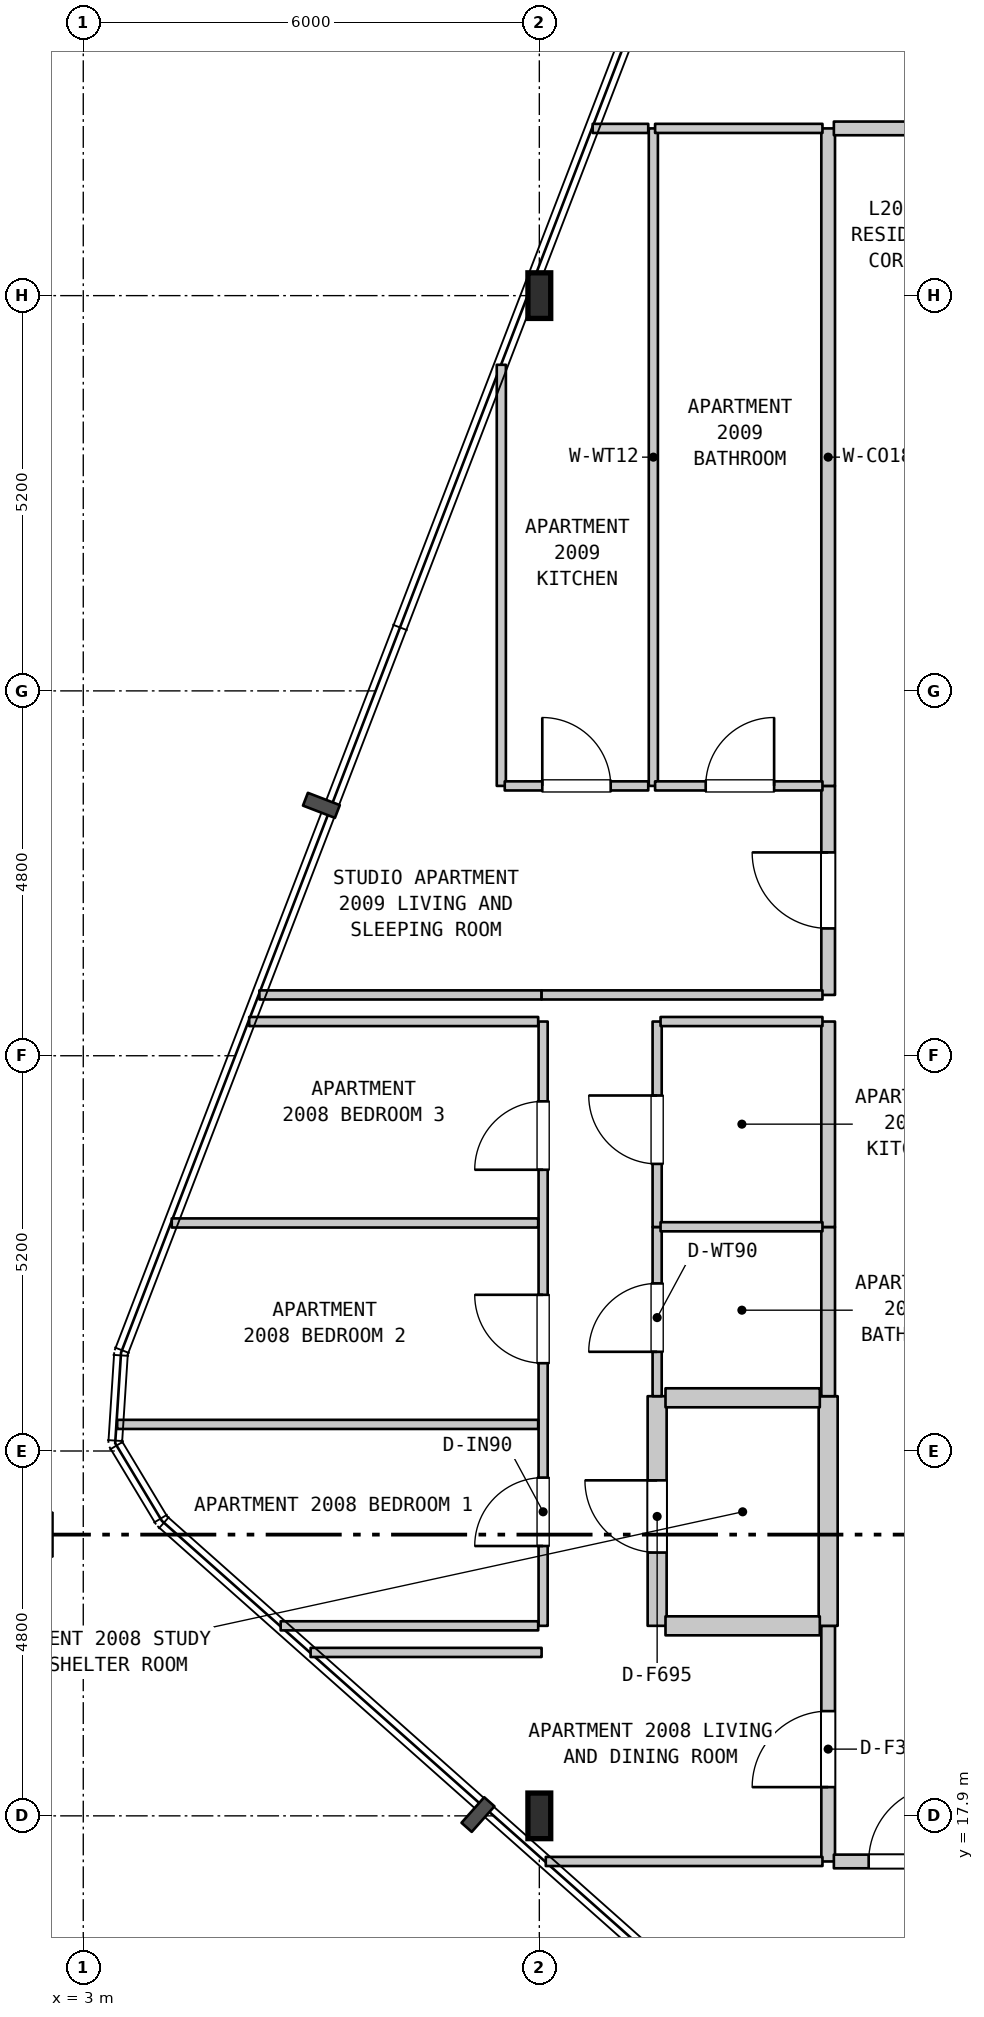
"""IFC4 building model, lengths in metres.
Left out: names, types, materials, properties, quantities, classifications, styles, units other than length and angle.
Written with IfcOpenShell. Run it as: python <this file> out.ifc"""

import sys

from ifc_helpers import new_model, si_unit, direction, frame, frame_2d, origin, origin_2d, place, context, subcontext, project, spatial, rectangle, i_section, extrude, element, fill, save


model = new_model("IFC4")
c1 = context("Model", 3, precision=1e-05, world=origin(), true_north=direction((0.0, 1.0)))
c2 = subcontext(c1, "Body", "Model", "MODEL_VIEW")
j1 = project(units=[si_unit("LENGTHUNIT", "METRE"), si_unit("PLANEANGLEUNIT", "RADIAN")], contexts=[c1])
p1 = place(None, origin())
s1 = spatial("IfcSite", under=j1, at=p1, CompositionType="ELEMENT")
p2 = place(p1, origin())
s2 = spatial("IfcBuilding", under=s1, at=p2, CompositionType="ELEMENT")
p3 = place(p2, frame((0.0, 0.0, 86.4)))
s3 = spatial("IfcBuildingStorey", under=s2, at=p3, CompositionType="ELEMENT", Elevation=86.4)
for number, where, z_axis, x_axis in (
    (1, (9.0, 17.9, 0.0), (0.0, 0.0, 1.0), (1.0, 0.0, 0.0)),
    (2, (9.0, 37.9, 0.0), (0.0, 0.0, 1.0), (1.0, 0.0, 0.0)),
):
    element("IfcColumn", number, at=place(p3, frame(where, z_axis=z_axis, x_axis=x_axis)), inside=s3, PredefinedType="COLUMN", context=c2, shape_type="SweptSolid", body=[
        extrude(i_section(OverallWidth=0.3, OverallDepth=0.6, WebThickness=0.015, FlangeThickness=0.03, FilletRadius=0.027, at=origin_2d()), origin(), (0.0, 0.0, 1.0), 4.5),
    ])
p4 = place(p3, frame((8.5, 31.45, 0.0), z_axis=(0.0, 0.0, 1.0), x_axis=(0.0, 1.0, 0.0)))
e3 = element("IfcWall", 3, at=p4, inside=s3, PredefinedType="PARTITIONING", context=c2, shape_type="SweptSolid", body=[
    extrude(rectangle(XDim=5.54, YDim=0.12, at=frame_2d((2.77, 0.0))), origin(), (0.0, 0.0, 1.0), 4.185),
])
p5 = place(p3, frame((9.05, 20.4, 0.0), z_axis=(0.0, 0.0, 1.0), x_axis=(0.0, 1.0, 0.0)))
e4 = element("IfcWall", 4, at=p5, inside=s3, PredefinedType="PARTITIONING", context=c2, shape_type="SweptSolid", body=[
    extrude(rectangle(XDim=7.95, YDim=0.12, at=frame_2d((3.975, 0.0))), origin(), (0.0, 0.0, 1.0), 3.585),
])
p6 = place(p5, frame((1.05, 0.0, 0.0)))
e5 = element("IfcOpeningElement", 5, at=p6, cuts=e4, PredefinedType="OPENING", context=c2, shape_type="SweptSolid", body=[
    extrude(rectangle(XDim=0.9, YDim=2.15, at=frame_2d((0.45, 1.075))), frame((0.0, 0.07, 0.0), z_axis=(0.0, -1.0, 0.0), x_axis=(1.0, 0.0, 0.0)), (0.0, 0.0, 1.0), 0.14),
])
p7 = place(p5, frame((3.455, 0.0, 0.0)))
e6 = element("IfcOpeningElement", 6, at=p7, cuts=e4, PredefinedType="OPENING", context=c2, shape_type="SweptSolid", body=[
    extrude(rectangle(XDim=0.9, YDim=2.15, at=frame_2d((0.45, 1.075))), frame((0.0, 0.07, 0.0), z_axis=(0.0, -1.0, 0.0), x_axis=(1.0, 0.0, 0.0)), (0.0, 0.0, 1.0), 0.14),
])
p8 = place(p5, frame((6.0, 0.0, 0.0)))
e7 = element("IfcOpeningElement", 7, at=p8, cuts=e4, PredefinedType="OPENING", context=c2, shape_type="SweptSolid", body=[
    extrude(rectangle(XDim=0.9, YDim=2.15, at=frame_2d((0.45, 1.075))), frame((0.0, 0.07, 0.0), z_axis=(0.0, -1.0, 0.0), x_axis=(1.0, 0.0, 0.0)), (0.0, 0.0, 1.0), 0.14),
])
p9 = place(p3, frame((10.5, 31.45, 0.0), z_axis=(0.0, 0.0, 1.0), x_axis=(0.0, 1.0, 0.0)))
e8 = element("IfcWall", 8, at=p9, inside=s3, PredefinedType="PARTITIONING", context=c2, shape_type="SweptSolid", body=[
    extrude(rectangle(XDim=8.65, YDim=0.12, at=frame_2d((4.325, 0.0))), origin(), (0.0, 0.0, 1.0), 4.185),
])
p10 = place(p3, frame((10.55, 20.4, 0.0), z_axis=(0.0, 0.0, 1.0), x_axis=(0.0, 1.0, 0.0)))
e9 = element("IfcWall", 9, at=p10, inside=s3, PredefinedType="STANDARD", context=c2, shape_type="SweptSolid", body=[
    extrude(rectangle(XDim=3.021, YDim=0.25, at=frame_2d((1.51, 0.0))), origin(), (0.0, 0.0, 1.0), 4.185),
])
p11 = place(p10, frame((0.964, 0.0, 0.0)))
e10 = element("IfcOpeningElement", 10, at=p11, cuts=e9, PredefinedType="OPENING", context=c2, shape_type="SweptSolid", body=[
    extrude(rectangle(XDim=0.95, YDim=2.15, at=frame_2d((0.475, 1.075))), frame((0.0, 0.135, 0.0), z_axis=(0.0, -1.0, 0.0), x_axis=(1.0, 0.0, 0.0)), (0.0, 0.0, 1.0), 0.27),
])
p12 = place(p3, frame((10.55, 23.421, 0.0), z_axis=(0.0, 0.0, 1.0), x_axis=(0.0, 1.0, 0.0)))
e11 = element("IfcWall", 11, at=p12, inside=s3, PredefinedType="PARTITIONING", context=c2, shape_type="SweptSolid", body=[
    extrude(rectangle(XDim=2.226, YDim=0.12, at=frame_2d((1.113, 0.0))), origin(), (0.0, 0.0, 1.0), 4.185),
])
p13 = place(p12, frame((0.584, 0.0, 0.0)))
e12 = element("IfcOpeningElement", 12, at=p13, cuts=e11, PredefinedType="OPENING", context=c2, shape_type="SweptSolid", body=[
    extrude(rectangle(XDim=0.9, YDim=2.1, at=frame_2d((0.45, 1.05))), frame((0.0, 0.07, 0.0), z_axis=(0.0, -1.0, 0.0), x_axis=(1.0, 0.0, 0.0)), (0.0, 0.0, 1.0), 0.14),
])
p14 = place(p3, frame((10.55, 25.647, 0.0), z_axis=(0.0, 0.0, 1.0), x_axis=(0.0, 1.0, 0.0)))
e13 = element("IfcWall", 13, at=p14, inside=s3, PredefinedType="PARTITIONING", context=c2, shape_type="SweptSolid", body=[
    extrude(rectangle(XDim=2.703, YDim=0.12, at=frame_2d((1.352, 0.0))), origin(), (0.0, 0.0, 1.0), 4.185),
])
p15 = place(p14, frame((0.83, 0.0, 0.0)))
e14 = element("IfcOpeningElement", 14, at=p15, cuts=e13, PredefinedType="OPENING", context=c2, shape_type="SweptSolid", body=[
    extrude(rectangle(XDim=0.9, YDim=2.15, at=frame_2d((0.45, 1.075))), frame((0.0, 0.07, 0.0), z_axis=(0.0, -1.0, 0.0), x_axis=(1.0, 0.0, 0.0)), (0.0, 0.0, 1.0), 0.14),
])
p16 = place(p3, frame((12.8, 17.3, 0.0), z_axis=(0.0, 0.0, 1.0), x_axis=(0.0, 1.0, 0.0)))
e15 = element("IfcWall", 15, at=p16, inside=s3, PredefinedType="STANDARD", context=c2, shape_type="SweptSolid", body=[
    extrude(rectangle(XDim=3.1, YDim=0.18, at=frame_2d((1.55, 0.0))), origin(), (0.0, 0.0, 1.0), 4.185),
])
p17 = place(p16, frame((0.978, 0.0, 0.0)))
e16 = element("IfcOpeningElement", 16, at=p17, cuts=e15, PredefinedType="OPENING", context=c2, shape_type="SweptSolid", body=[
    extrude(rectangle(XDim=1.0, YDim=2.15, at=frame_2d((0.5, 1.075))), frame((0.0, 0.1, 0.0), z_axis=(0.0, -1.0, 0.0), x_axis=(1.0, 0.0, 0.0)), (0.0, 0.0, 1.0), 0.2),
])
p18 = place(p3, frame((12.8, 20.4, 0.0), z_axis=(0.0, 0.0, 1.0), x_axis=(0.0, 1.0, 0.0)))
e17 = element("IfcWall", 17, at=p18, inside=s3, PredefinedType="STANDARD", context=c2, shape_type="SweptSolid", body=[
    extrude(rectangle(XDim=3.021, YDim=0.25, at=frame_2d((1.51, 0.0))), origin(), (0.0, 0.0, 1.0), 4.185),
])
p19 = place(p3, frame((12.8, 23.421, 0.0), z_axis=(0.0, 0.0, 1.0), x_axis=(0.0, 1.0, 0.0)))
e18 = element("IfcWall", 18, at=p19, inside=s3, PredefinedType="STANDARD", context=c2, shape_type="SweptSolid", body=[
    extrude(rectangle(XDim=2.226, YDim=0.18, at=frame_2d((1.113, 0.0))), origin(), (0.0, 0.0, 1.0), 4.185),
])
p20 = place(p3, frame((12.8, 25.647, 0.0), z_axis=(0.0, 0.0, 1.0), x_axis=(0.0, 1.0, 0.0)))
e19 = element("IfcWall", 19, at=p20, inside=s3, PredefinedType="STANDARD", context=c2, shape_type="SweptSolid", body=[
    extrude(rectangle(XDim=2.703, YDim=0.18, at=frame_2d((1.352, 0.0))), origin(), (0.0, 0.0, 1.0), 4.185),
])
p21 = place(p3, frame((12.8, 28.7, 0.0), z_axis=(0.0, 0.0, 1.0), x_axis=(0.0, 1.0, 0.0)))
e20 = element("IfcWall", 20, at=p21, inside=s3, PredefinedType="STANDARD", context=c2, shape_type="SweptSolid", body=[
    extrude(rectangle(XDim=2.75, YDim=0.18, at=frame_2d((1.375, 0.0))), origin(), (0.0, 0.0, 1.0), 4.185),
])
p22 = place(p21, frame((0.875, 0.0, 0.0)))
e21 = element("IfcOpeningElement", 21, at=p22, cuts=e20, PredefinedType="OPENING", context=c2, shape_type="SweptSolid", body=[
    extrude(rectangle(XDim=1.0, YDim=2.15, at=frame_2d((0.5, 1.075))), frame((0.0, 0.1, 0.0), z_axis=(0.0, -1.0, 0.0), x_axis=(1.0, 0.0, 0.0)), (0.0, 0.0, 1.0), 0.2),
])
p23 = place(p3, frame((12.8, 31.45, 0.0), z_axis=(0.0, 0.0, 1.0), x_axis=(0.0, 1.0, 0.0)))
e22 = element("IfcWall", 22, at=p23, inside=s3, PredefinedType="STANDARD", context=c2, shape_type="SweptSolid", body=[
    extrude(rectangle(XDim=8.65, YDim=0.18, at=frame_2d((4.325, 0.0))), origin(), (0.0, 0.0, 1.0), 4.185),
])
p24 = place(p3, frame((9.085, 17.3, 0.0), z_axis=(0.0, 0.0, 1.0), x_axis=(1.0, 0.0, 0.0)))
e23 = element("IfcWall", 23, at=p24, inside=s3, PredefinedType="PARTITIONING", context=c2, shape_type="SweptSolid", body=[
    extrude(rectangle(XDim=3.64, YDim=0.12, at=frame_2d((1.82, 0.0))), origin(), (0.0, 0.0, 1.0), 4.185),
])
p25 = place(p3, frame((12.875, 17.3, 0.0), z_axis=(0.0, 0.0, 1.0), x_axis=(1.0, 0.0, 0.0)))
e24 = element("IfcWall", 24, at=p25, inside=s3, PredefinedType="STANDARD", context=c2, shape_type="SweptSolid", body=[
    extrude(rectangle(XDim=3.78, YDim=0.18, at=frame_2d((1.89, 0.0))), origin(), (0.0, 0.0, 1.0), 4.185),
])
p26 = place(p25, frame((0.458, 0.0, 0.0)))
e25 = element("IfcOpeningElement", 25, at=p26, cuts=e24, PredefinedType="OPENING", context=c2, shape_type="SweptSolid", body=[
    extrude(rectangle(XDim=1.0, YDim=2.15, at=frame_2d((0.5, 1.075))), frame((0.0, 0.1, 0.0), z_axis=(0.0, -1.0, 0.0), x_axis=(1.0, 0.0, 0.0)), (0.0, 0.0, 1.0), 0.2),
])
p27 = place(p3, frame((5.991, 20.05, 0.0), z_axis=(0.0, 0.0, 1.0), x_axis=(1.0, 0.0, 0.0)))
e26 = element("IfcWall", 26, at=p27, inside=s3, PredefinedType="PARTITIONING", context=c2, shape_type="SweptSolid", body=[
    extrude(rectangle(XDim=3.039, YDim=0.12, at=frame_2d((1.52, 0.0))), origin(), (0.0, 0.0, 1.0), 4.185),
])
p28 = place(p3, frame((5.597, 20.4, 0.0), z_axis=(0.0, 0.0, 1.0), x_axis=(1.0, 0.0, 0.0)))
e27 = element("IfcWall", 27, at=p28, inside=s3, PredefinedType="PARTITIONING", context=c2, shape_type="SweptSolid", body=[
    extrude(rectangle(XDim=3.388, YDim=0.12, at=frame_2d((1.694, 0.0))), origin(), (0.0, 0.0, 1.0), 4.185),
])
p29 = place(p3, frame((10.66, 20.4, 0.0), z_axis=(0.0, 0.0, 1.0), x_axis=(1.0, 0.0, 0.0)))
e28 = element("IfcWall", 28, at=p29, inside=s3, PredefinedType="STANDARD", context=c2, shape_type="SweptSolid", body=[
    extrude(rectangle(XDim=2.03, YDim=0.25, at=frame_2d((1.015, 0.0))), origin(), (0.0, 0.0, 1.0), 4.185),
])
p30 = place(p3, frame((3.446, 23.05, 0.0), z_axis=(0.0, 0.0, 1.0), x_axis=(1.0, 0.0, 0.0)))
e29 = element("IfcWall", 29, at=p30, inside=s3, PredefinedType="PARTITIONING", context=c2, shape_type="SweptSolid", body=[
    extrude(rectangle(XDim=5.539, YDim=0.12, at=frame_2d((2.77, 0.0))), origin(), (0.0, 0.0, 1.0), 4.185),
])
p31 = place(p3, frame((10.66, 23.4, 0.0), z_axis=(0.0, 0.0, 1.0), x_axis=(1.0, 0.0, 0.0)))
e30 = element("IfcWall", 30, at=p31, inside=s3, PredefinedType="STANDARD", context=c2, shape_type="SweptSolid", body=[
    extrude(rectangle(XDim=2.03, YDim=0.25, at=frame_2d((1.015, 0.0))), origin(), (0.0, 0.0, 1.0), 4.185),
])
p32 = place(p3, frame((10.595, 25.65, 0.0), z_axis=(0.0, 0.0, 1.0), x_axis=(1.0, 0.0, 0.0)))
e31 = element("IfcWall", 31, at=p32, inside=s3, PredefinedType="PARTITIONING", context=c2, shape_type="SweptSolid", body=[
    extrude(rectangle(XDim=2.13, YDim=0.12, at=frame_2d((1.065, 0.0))), origin(), (0.0, 0.0, 1.0), 4.185),
])
p33 = place(p3, frame((4.164, 25.7, 0.0), z_axis=(0.0, 0.0, 1.0), x_axis=(1.0, 0.0, 0.0)))
e32 = element("IfcWall", 32, at=p33, inside=s3, PredefinedType="PARTITIONING", context=c2, shape_type="SweptSolid", body=[
    extrude(rectangle(XDim=4.821, YDim=0.12, at=frame_2d((2.411, 0.0))), origin(), (0.0, 0.0, 1.0), 4.185),
])
p34 = place(p3, frame((5.183, 28.35, 0.0), z_axis=(0.0, 0.0, 1.0), x_axis=(1.0, 0.0, 0.0)))
e33 = element("IfcWall", 33, at=p34, inside=s3, PredefinedType="PARTITIONING", context=c2, shape_type="SweptSolid", body=[
    extrude(rectangle(XDim=3.802, YDim=0.12, at=frame_2d((1.901, 0.0))), origin(), (0.0, 0.0, 1.0), 4.185),
])
p35 = place(p3, frame((10.595, 28.35, 0.0), z_axis=(0.0, 0.0, 1.0), x_axis=(1.0, 0.0, 0.0)))
e34 = element("IfcWall", 34, at=p35, inside=s3, PredefinedType="PARTITIONING", context=c2, shape_type="SweptSolid", body=[
    extrude(rectangle(XDim=2.13, YDim=0.12, at=frame_2d((1.065, 0.0))), origin(), (0.0, 0.0, 1.0), 4.185),
])
p36 = place(p3, frame((5.317, 28.7, 0.0), z_axis=(0.0, 0.0, 1.0), x_axis=(1.0, 0.0, 0.0)))
e35 = element("IfcWall", 35, at=p36, inside=s3, PredefinedType="PARTITIONING", context=c2, shape_type="SweptSolid", body=[
    extrude(rectangle(XDim=3.713, YDim=0.12, at=frame_2d((1.856, 0.0))), origin(), (0.0, 0.0, 1.0), 4.185),
])
p37 = place(p3, frame((9.03, 28.7, 0.0), z_axis=(0.0, 0.0, 1.0), x_axis=(1.0, 0.0, 0.0)))
e36 = element("IfcWall", 36, at=p37, inside=s3, PredefinedType="PARTITIONING", context=c2, shape_type="SweptSolid", body=[
    extrude(rectangle(XDim=3.695, YDim=0.12, at=frame_2d((1.848, 0.0))), origin(), (0.0, 0.0, 1.0), 4.185),
])
p38 = place(p3, frame((8.545, 31.45, 0.0), z_axis=(0.0, 0.0, 1.0), x_axis=(1.0, 0.0, 0.0)))
e37 = element("IfcWall", 37, at=p38, inside=s3, PredefinedType="PARTITIONING", context=c2, shape_type="SweptSolid", body=[
    extrude(rectangle(XDim=1.888, YDim=0.12, at=frame_2d((0.944, 0.0))), origin(), (0.0, 0.0, 1.0), 4.185),
])
p39 = place(p38, frame((0.494, 0.0, 0.0)))
e38 = element("IfcOpeningElement", 38, at=p39, cuts=e37, PredefinedType="OPENING", context=c2, shape_type="SweptSolid", body=[
    extrude(rectangle(XDim=0.9, YDim=2.15, at=frame_2d((0.45, 1.075))), frame((0.0, 0.07, 0.0), z_axis=(0.0, -1.0, 0.0), x_axis=(1.0, 0.0, 0.0)), (0.0, 0.0, 1.0), 0.14),
])
p40 = place(p3, frame((10.523, 31.45, 0.0), z_axis=(0.0, 0.0, 1.0), x_axis=(1.0, 0.0, 0.0)))
e39 = element("IfcWall", 39, at=p40, inside=s3, PredefinedType="PARTITIONING", context=c2, shape_type="SweptSolid", body=[
    extrude(rectangle(XDim=2.202, YDim=0.12, at=frame_2d((1.101, 0.0))), origin(), (0.0, 0.0, 1.0), 4.185),
])
p41 = place(p40, frame((0.666, 0.0, 0.0)))
e40 = element("IfcOpeningElement", 40, at=p41, cuts=e39, PredefinedType="OPENING", context=c2, shape_type="SweptSolid", body=[
    extrude(rectangle(XDim=0.9, YDim=2.1, at=frame_2d((0.45, 1.05))), frame((0.0, 0.07, 0.0), z_axis=(0.0, -1.0, 0.0), x_axis=(1.0, 0.0, 0.0)), (0.0, 0.0, 1.0), 0.14),
])
p42 = place(p3, frame((9.702, 40.1, 0.0), z_axis=(0.0, 0.0, 1.0), x_axis=(1.0, 0.0, 0.0)))
e41 = element("IfcWall", 41, at=p42, inside=s3, PredefinedType="PARTITIONING", context=c2, shape_type="SweptSolid", body=[
    extrude(rectangle(XDim=0.731, YDim=0.12, at=frame_2d((0.366, 0.0))), origin(), (0.0, 0.0, 1.0), 4.185),
])
p43 = place(p3, frame((10.523, 40.1, 0.0), z_axis=(0.0, 0.0, 1.0), x_axis=(1.0, 0.0, 0.0)))
e42 = element("IfcWall", 42, at=p43, inside=s3, PredefinedType="PARTITIONING", context=c2, shape_type="SweptSolid", body=[
    extrude(rectangle(XDim=2.202, YDim=0.12, at=frame_2d((1.101, 0.0))), origin(), (0.0, 0.0, 1.0), 4.185),
])
p44 = place(p3, frame((12.875, 40.1, 0.0), z_axis=(0.0, 0.0, 1.0), x_axis=(1.0, 0.0, 0.0)))
e43 = element("IfcWall", 43, at=p44, inside=s3, PredefinedType="STANDARD", context=c2, shape_type="SweptSolid", body=[
    extrude(rectangle(XDim=3.49, YDim=0.18, at=frame_2d((1.745, 0.0))), origin(), (0.0, 0.0, 1.0), 4.185),
])
p45 = place(p44, frame((1.16, 0.0, 0.0)))
e44 = element("IfcOpeningElement", 44, at=p45, cuts=e43, PredefinedType="OPENING", context=c2, shape_type="SweptSolid", body=[
    extrude(rectangle(XDim=1.0, YDim=2.15, at=frame_2d((0.5, 1.075))), frame((0.0, 0.1, 0.0), z_axis=(0.0, -1.0, 0.0), x_axis=(1.0, 0.0, 0.0)), (0.0, 0.0, 1.0), 0.2),
])
p46 = place(p6, origin())
e45 = element("IfcDoor", 45, at=p46, inside=s3, OperationType="SINGLE_SWING_LEFT", PredefinedType="DOOR", context=c2, shape_type="SweptSolid", body=[
    extrude(rectangle(XDim=0.9, YDim=2.15, at=frame_2d((0.45, 1.075))), frame((0.0, 0.025, 0.0), z_axis=(0.0, -1.0, 0.0), x_axis=(1.0, 0.0, 0.0)), (0.0, 0.0, 1.0), 0.05),
])
fill(e5, e45)
p47 = place(p7, origin())
e46 = element("IfcDoor", 46, at=p47, inside=s3, OperationType="SINGLE_SWING_RIGHT", PredefinedType="DOOR", context=c2, shape_type="SweptSolid", body=[
    extrude(rectangle(XDim=0.9, YDim=2.15, at=frame_2d((0.45, 1.075))), frame((0.0, 0.025, 0.0), z_axis=(0.0, -1.0, 0.0), x_axis=(1.0, 0.0, 0.0)), (0.0, 0.0, 1.0), 0.05),
])
fill(e6, e46)
p48 = place(p8, origin())
e47 = element("IfcDoor", 47, at=p48, inside=s3, OperationType="SINGLE_SWING_LEFT", PredefinedType="DOOR", context=c2, shape_type="SweptSolid", body=[
    extrude(rectangle(XDim=0.9, YDim=2.15, at=frame_2d((0.45, 1.075))), frame((0.0, 0.025, 0.0), z_axis=(0.0, -1.0, 0.0), x_axis=(1.0, 0.0, 0.0)), (0.0, 0.0, 1.0), 0.05),
])
fill(e7, e47)
p49 = place(p11, origin())
e48 = element("IfcDoor", 48, at=p49, inside=s3, OperationType="SINGLE_SWING_RIGHT", PredefinedType="DOOR", context=c2, shape_type="SweptSolid", body=[
    extrude(rectangle(XDim=0.95, YDim=2.15, at=frame_2d((0.475, 1.075))), frame((0.0, 0.025, 0.0), z_axis=(0.0, -1.0, 0.0), x_axis=(1.0, 0.0, 0.0)), (0.0, 0.0, 1.0), 0.05),
])
fill(e10, e48)
p50 = place(p13, origin())
e49 = element("IfcDoor", 49, at=p50, inside=s3, OperationType="SINGLE_SWING_LEFT", PredefinedType="DOOR", context=c2, shape_type="SweptSolid", body=[
    extrude(rectangle(XDim=0.9, YDim=2.1, at=frame_2d((0.45, 1.05))), frame((0.0, 0.025, 0.0), z_axis=(0.0, -1.0, 0.0), x_axis=(1.0, 0.0, 0.0)), (0.0, 0.0, 1.0), 0.05),
])
fill(e12, e49)
p51 = place(p15, origin())
e50 = element("IfcDoor", 50, at=p51, inside=s3, OperationType="SINGLE_SWING_RIGHT", PredefinedType="DOOR", context=c2, shape_type="SweptSolid", body=[
    extrude(rectangle(XDim=0.9, YDim=2.15, at=frame_2d((0.45, 1.075))), frame((0.0, 0.025, 0.0), z_axis=(0.0, -1.0, 0.0), x_axis=(1.0, 0.0, 0.0)), (0.0, 0.0, 1.0), 0.05),
])
fill(e14, e50)
p52 = place(p17, origin())
e51 = element("IfcDoor", 51, at=p52, inside=s3, OperationType="SINGLE_SWING_LEFT", PredefinedType="DOOR", context=c2, shape_type="SweptSolid", body=[
    extrude(rectangle(XDim=1.0, YDim=2.15, at=frame_2d((0.5, 1.075))), frame((0.0, 0.025, 0.0), z_axis=(0.0, -1.0, 0.0), x_axis=(1.0, 0.0, 0.0)), (0.0, 0.0, 1.0), 0.05),
])
fill(e16, e51)
p53 = place(p22, origin())
e52 = element("IfcDoor", 52, at=p53, inside=s3, OperationType="SINGLE_SWING_RIGHT", PredefinedType="DOOR", context=c2, shape_type="SweptSolid", body=[
    extrude(rectangle(XDim=1.0, YDim=2.15, at=frame_2d((0.5, 1.075))), frame((0.0, 0.025, 0.0), z_axis=(0.0, -1.0, 0.0), x_axis=(1.0, 0.0, 0.0)), (0.0, 0.0, 1.0), 0.05),
])
fill(e21, e52)
p54 = place(p26, origin())
e53 = element("IfcDoor", 53, at=p54, inside=s3, OperationType="SINGLE_SWING_RIGHT", PredefinedType="DOOR", context=c2, shape_type="SweptSolid", body=[
    extrude(rectangle(XDim=1.0, YDim=2.15, at=frame_2d((0.5, 1.075))), frame((0.0, 0.025, 0.0), z_axis=(0.0, -1.0, 0.0), x_axis=(1.0, 0.0, 0.0)), (0.0, 0.0, 1.0), 0.05),
])
fill(e25, e53)
p55 = place(p39, origin())
e54 = element("IfcDoor", 54, at=p55, inside=s3, OperationType="SINGLE_SWING_LEFT", PredefinedType="DOOR", context=c2, shape_type="SweptSolid", body=[
    extrude(rectangle(XDim=0.9, YDim=2.15, at=frame_2d((0.45, 1.075))), frame((0.0, 0.025, 0.0), z_axis=(0.0, -1.0, 0.0), x_axis=(1.0, 0.0, 0.0)), (0.0, 0.0, 1.0), 0.05),
])
fill(e38, e54)
p56 = place(p41, origin())
e55 = element("IfcDoor", 55, at=p56, inside=s3, OperationType="SINGLE_SWING_RIGHT", PredefinedType="DOOR", context=c2, shape_type="SweptSolid", body=[
    extrude(rectangle(XDim=0.9, YDim=2.1, at=frame_2d((0.45, 1.05))), frame((0.0, 0.025, 0.0), z_axis=(0.0, -1.0, 0.0), x_axis=(1.0, 0.0, 0.0)), (0.0, 0.0, 1.0), 0.05),
])
fill(e40, e55)
save(model, sys.argv[1])
